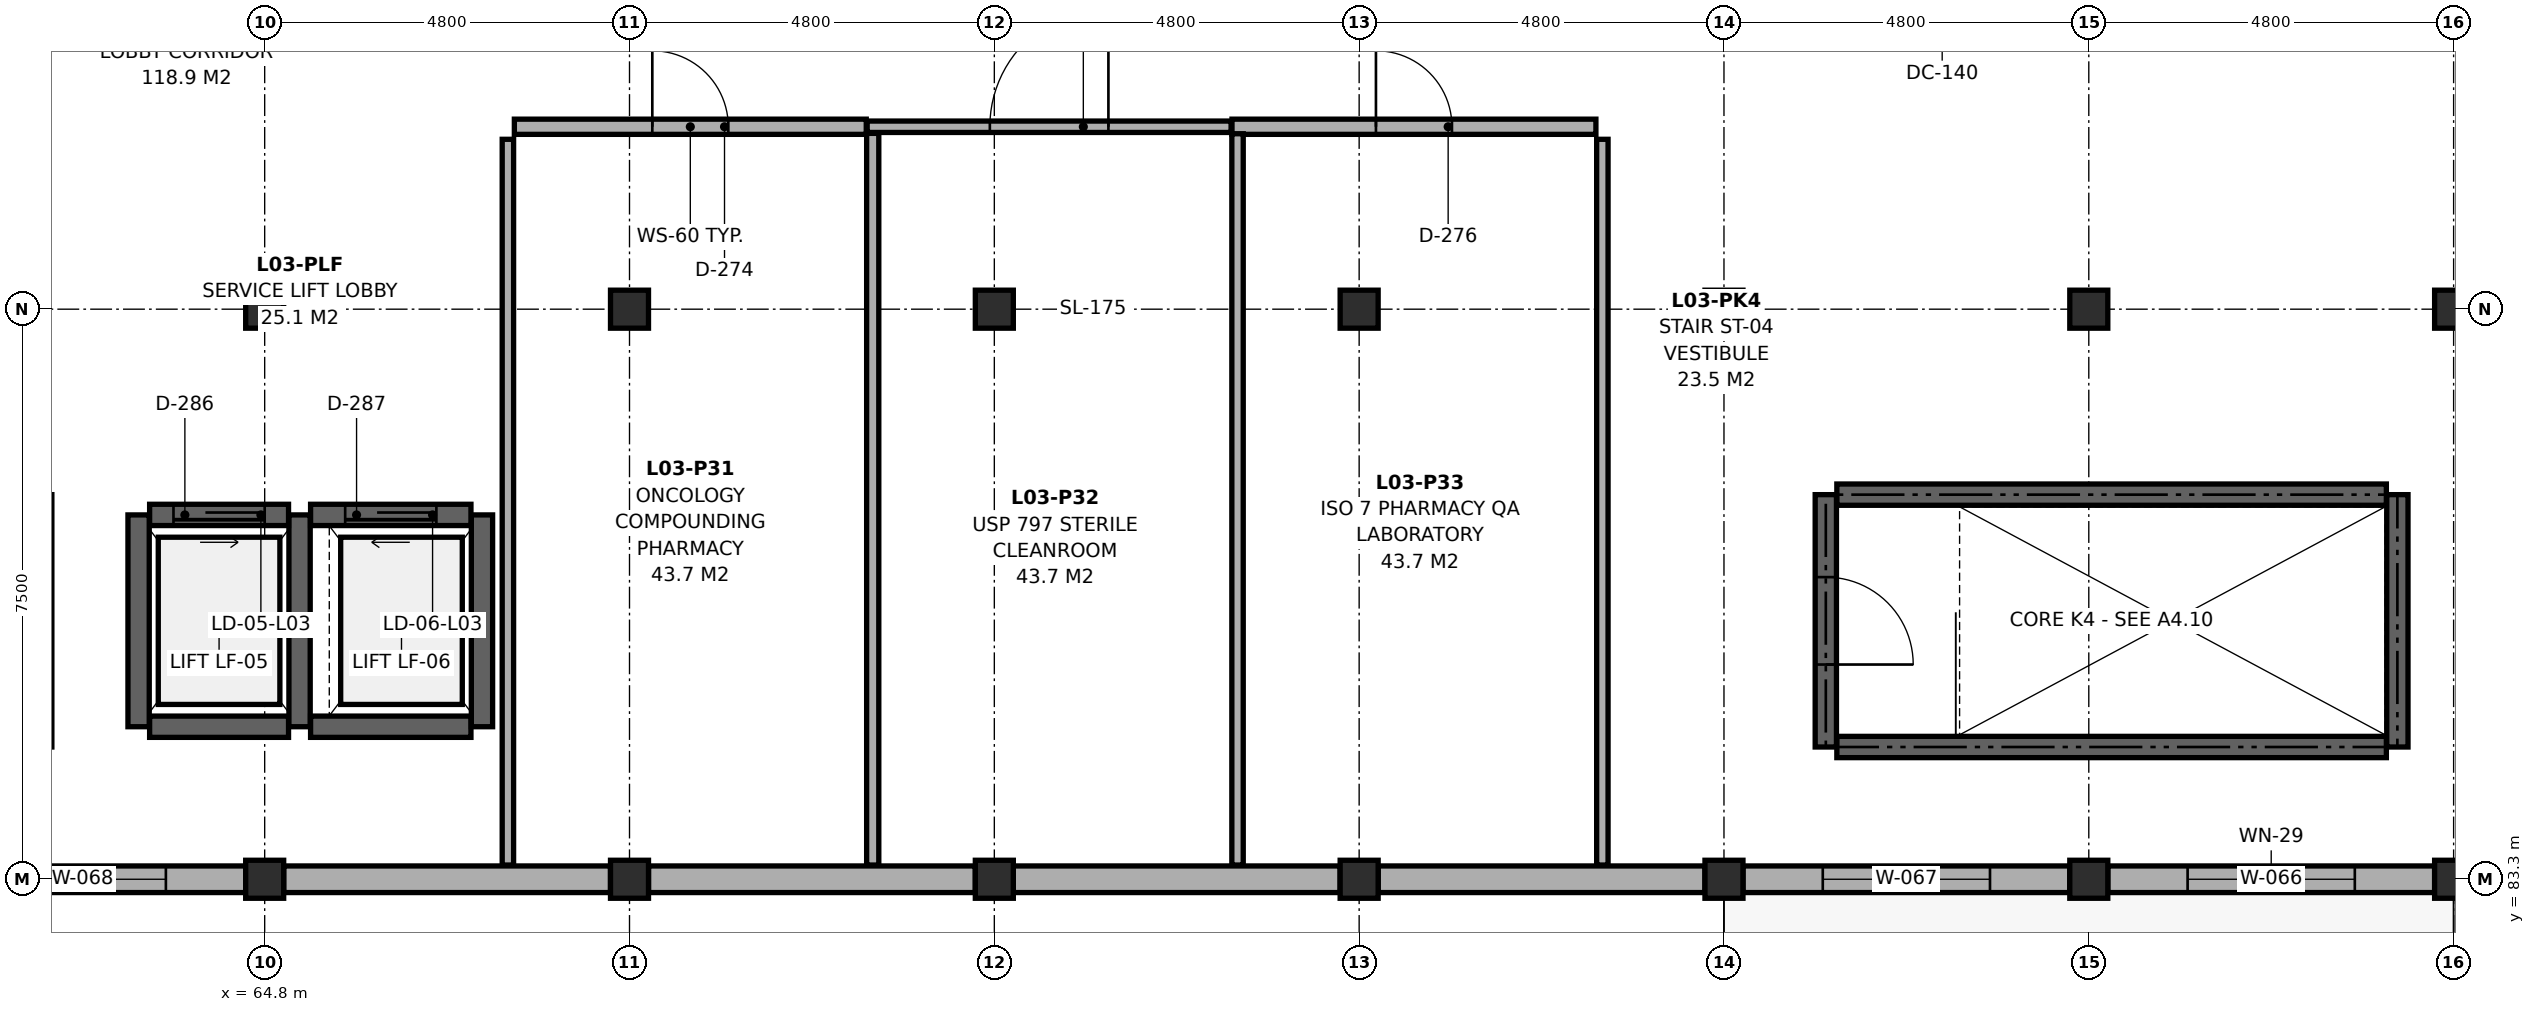
"""IFC4 building model, lengths in metres.
Left out: names, types, materials, properties, quantities, classifications, styles, units other than length and angle.
Written with IfcOpenShell. Run it as: python <this file> out.ifc"""

import sys

from ifc_helpers import new_model, si_unit, direction, frame, frame_2d, origin, origin_2d, place, context, subcontext, project, spatial, rectangle, extrude, element, fill, save


model = new_model("IFC4")
c1 = context("Model", 3, precision=1e-05, world=origin(), true_north=direction((0.0, 1.0)))
c2 = subcontext(c1, "Body", "Model", "MODEL_VIEW")
j1 = project(units=[si_unit("LENGTHUNIT", "METRE"), si_unit("PLANEANGLEUNIT", "RADIAN")], contexts=[c1])
p1 = place(None, origin())
s1 = spatial("IfcSite", under=j1, at=p1, CompositionType="ELEMENT")
p2 = place(p1, origin())
s2 = spatial("IfcBuilding", under=s1, at=p2, CompositionType="ELEMENT")
p3 = place(p2, frame((0.0, 0.0, 13.5)))
s3 = spatial("IfcBuildingStorey", under=s2, at=p3, CompositionType="ELEMENT", Elevation=13.5)
p4 = place(p3, frame((64.8, 83.3, 0.0), z_axis=(0.0, 0.0, 1.0), x_axis=(1.0, 0.0, 0.0)))
e1 = element("IfcColumn", 1, at=p4, inside=s3, PredefinedType="COLUMN", context=c2, shape_type="SweptSolid", body=[
    extrude(rectangle(XDim=0.5, YDim=0.5, at=origin_2d()), origin(), (0.0, 0.0, 1.0), 3.829),
])
p5 = place(p3, frame((64.8, 90.8, 0.0), z_axis=(0.0, 0.0, 1.0), x_axis=(1.0, 0.0, 0.0)))
e2 = element("IfcColumn", 2, at=p5, inside=s3, PredefinedType="COLUMN", context=c2, shape_type="SweptSolid", body=[
    extrude(rectangle(XDim=0.5, YDim=0.5, at=origin_2d()), origin(), (0.0, 0.0, 1.0), 4.429),
])
p6 = place(p3, frame((69.6, 83.3, 0.0), z_axis=(0.0, 0.0, 1.0), x_axis=(1.0, 0.0, 0.0)))
e3 = element("IfcColumn", 3, at=p6, inside=s3, PredefinedType="COLUMN", context=c2, shape_type="SweptSolid", body=[
    extrude(rectangle(XDim=0.5, YDim=0.5, at=origin_2d()), origin(), (0.0, 0.0, 1.0), 3.829),
])
p7 = place(p3, frame((69.6, 90.8, 0.0), z_axis=(0.0, 0.0, 1.0), x_axis=(1.0, 0.0, 0.0)))
e4 = element("IfcColumn", 4, at=p7, inside=s3, PredefinedType="COLUMN", context=c2, shape_type="SweptSolid", body=[
    extrude(rectangle(XDim=0.5, YDim=0.5, at=origin_2d()), origin(), (0.0, 0.0, 1.0), 4.429),
])
for number, where, z_axis, x_axis in (
    (5, (74.4, 83.3, 0.0), (0.0, 0.0, 1.0), (1.0, 0.0, 0.0)),
    (6, (74.4, 90.8, 0.0), (0.0, 0.0, 1.0), (1.0, 0.0, 0.0)),
    (7, (79.2, 83.3, 0.0), (0.0, 0.0, 1.0), (1.0, 0.0, 0.0)),
    (8, (79.2, 90.8, 0.0), (0.0, 0.0, 1.0), (1.0, 0.0, 0.0)),
    (9, (84.0, 83.3, 0.0), (0.0, 0.0, 1.0), (1.0, 0.0, 0.0)),
    (10, (84.0, 90.8, 0.0), (0.0, 0.0, 1.0), (1.0, 0.0, 0.0)),
    (11, (88.8, 83.3, 0.0), (0.0, 0.0, 1.0), (1.0, 0.0, 0.0)),
    (12, (88.8, 90.8, 0.0), (0.0, 0.0, 1.0), (1.0, 0.0, 0.0)),
    (13, (93.6, 83.3, 0.0), (0.0, 0.0, 1.0), (1.0, 0.0, 0.0)),
    (14, (93.6, 90.8, 0.0), (0.0, 0.0, 1.0), (1.0, 0.0, 0.0)),
):
    element("IfcColumn", number, at=place(p3, frame(where, z_axis=z_axis, x_axis=x_axis)), inside=s3, PredefinedType="COLUMN", context=c2, shape_type="SweptSolid", body=[
        extrude(rectangle(XDim=0.5, YDim=0.5, at=origin_2d()), origin(), (0.0, 0.0, 1.0), 3.8),
    ])
p8 = place(p3, frame((93.35, 83.3, 0.0), z_axis=(0.0, 0.0, 1.0), x_axis=(-1.0, 0.0, 0.0)))
e15 = element("IfcWall", 15, at=p8, inside=s3, PredefinedType="SOLIDWALL", context=c2, shape_type="SweptSolid", body=[
    extrude(rectangle(XDim=4.3, YDim=0.35, at=frame_2d((2.15, 0.0))), origin(), (0.0, 0.0, 1.0), 3.7),
])
p9 = place(p8, frame((1.05, 0.0, 0.9)))
e16 = element("IfcOpeningElement", 16, at=p9, cuts=e15, PredefinedType="OPENING", context=c2, shape_type="SweptSolid", body=[
    extrude(rectangle(XDim=2.2, YDim=1.3, at=frame_2d((1.1, 0.65))), frame((0.0, 0.187, 0.0), z_axis=(0.0, -1.0, 0.0), x_axis=(1.0, 0.0, 0.0)), (0.0, 0.0, 1.0), 0.374),
])
p10 = place(p3, frame((88.55, 83.3, 0.0), z_axis=(0.0, 0.0, 1.0), x_axis=(-1.0, 0.0, 0.0)))
e17 = element("IfcWall", 17, at=p10, inside=s3, PredefinedType="SOLIDWALL", context=c2, shape_type="SweptSolid", body=[
    extrude(rectangle(XDim=4.3, YDim=0.35, at=frame_2d((2.15, 0.0))), origin(), (0.0, 0.0, 1.0), 3.7),
])
p11 = place(p10, frame((1.05, 0.0, 0.9)))
e18 = element("IfcOpeningElement", 18, at=p11, cuts=e17, PredefinedType="OPENING", context=c2, shape_type="SweptSolid", body=[
    extrude(rectangle(XDim=2.2, YDim=1.5, at=frame_2d((1.1, 0.75))), frame((0.0, 0.187, 0.0), z_axis=(0.0, -1.0, 0.0), x_axis=(1.0, 0.0, 0.0)), (0.0, 0.0, 1.0), 0.374),
])
for number, where, z_axis, x_axis in (
    (19, (83.75, 83.3, 0.0), (0.0, 0.0, 1.0), (-1.0, 0.0, 0.0)),
    (20, (78.95, 83.3, 0.0), (0.0, 0.0, 1.0), (-1.0, 0.0, 0.0)),
):
    element("IfcWall", number, at=place(p3, frame(where, z_axis=z_axis, x_axis=x_axis)), inside=s3, PredefinedType="SOLIDWALL", context=c2, shape_type="SweptSolid", body=[
        extrude(rectangle(XDim=4.3, YDim=0.35, at=frame_2d((2.15, 0.0))), origin(), (0.0, 0.0, 1.0), 3.7),
    ])
p12 = place(p3, frame((74.15, 83.3, 0.0), z_axis=(0.0, 0.0, 1.0), x_axis=(-1.0, 0.0, 0.0)))
e21 = element("IfcWall", 21, at=p12, inside=s3, PredefinedType="SOLIDWALL", context=c2, shape_type="SweptSolid", body=[
    extrude(rectangle(XDim=4.3, YDim=0.35, at=frame_2d((2.15, 0.0))), origin(), (0.0, 0.0, 1.0), 3.7),
])
p13 = place(p3, frame((69.35, 83.3, 0.0), z_axis=(0.0, 0.0, 1.0), x_axis=(-1.0, 0.0, 0.0)))
e22 = element("IfcWall", 22, at=p13, inside=s3, PredefinedType="SOLIDWALL", context=c2, shape_type="SweptSolid", body=[
    extrude(rectangle(XDim=4.3, YDim=0.35, at=frame_2d((2.15, 0.0))), origin(), (0.0, 0.0, 1.0), 3.7),
])
p14 = place(p3, frame((64.55, 83.3, 0.0), z_axis=(0.0, 0.0, 1.0), x_axis=(-1.0, 0.0, 0.0)))
e23 = element("IfcWall", 23, at=p14, inside=s3, PredefinedType="SOLIDWALL", context=c2, shape_type="SweptSolid", body=[
    extrude(rectangle(XDim=4.3, YDim=0.35, at=frame_2d((2.15, 0.0))), origin(), (0.0, 0.0, 1.0), 3.7),
])
p15 = place(p14, frame((1.05, 0.0, 0.9)))
e24 = element("IfcOpeningElement", 24, at=p15, cuts=e23, PredefinedType="OPENING", context=c2, shape_type="SweptSolid", body=[
    extrude(rectangle(XDim=2.2, YDim=1.7, at=frame_2d((1.1, 0.85))), frame((0.0, 0.187, 0.0), z_axis=(0.0, -1.0, 0.0), x_axis=(1.0, 0.0, 0.0)), (0.0, 0.0, 1.0), 0.374),
])
p16 = place(p3, frame((61.86, 85.04, 0.0), z_axis=(0.0, 0.0, 1.0), x_axis=(0.0, 1.0, 0.0)))
e25 = element("IfcWall", 25, at=p16, inside=s3, PredefinedType="SHEAR", context=c2, shape_type="SweptSolid", body=[
    extrude(rectangle(XDim=3.32, YDim=0.28, at=frame_2d((1.66, 0.0))), origin(), (0.0, 0.0, 1.0), 3.72),
])
p17 = place(p3, frame((63.286, 85.307, 0.0), z_axis=(0.0, 0.0, 1.0), x_axis=(1.0, 0.0, 0.0)))
e26 = element("IfcWall", 26, at=p17, inside=s3, PredefinedType="SHEAR", context=c2, shape_type="SweptSolid", body=[
    extrude(rectangle(XDim=1.828, YDim=0.28, at=frame_2d((0.914, 0.0))), origin(), (0.0, 0.0, 1.0), 5.3),
])
p18 = place(p3, frame((65.259, 85.307, 0.0), z_axis=(0.0, 0.0, 1.0), x_axis=(0.0, 1.0, 0.0)))
e27 = element("IfcWall", 27, at=p18, inside=s3, PredefinedType="SHEAR", context=c2, shape_type="SweptSolid", body=[
    extrude(rectangle(XDim=2.787, YDim=0.28, at=frame_2d((1.393, 0.0))), origin(), (0.0, 0.0, 1.0), 5.3),
])
p19 = place(p3, frame((65.114, 88.093, 0.0), z_axis=(0.0, 0.0, 1.0), x_axis=(-1.0, 0.0, 0.0)))
e28 = element("IfcWall", 28, at=p19, inside=s3, PredefinedType="SHEAR", context=c2, shape_type="SweptSolid", body=[
    extrude(rectangle(XDim=1.828, YDim=0.28, at=frame_2d((0.914, 0.0))), origin(), (0.0, 0.0, 1.0), 5.3),
])
p20 = place(p19, frame((0.314, 0.0, 0.0)))
e29 = element("IfcOpeningElement", 29, at=p20, cuts=e28, PredefinedType="OPENING", context=c2, shape_type="SweptSolid", body=[
    extrude(rectangle(XDim=1.2, YDim=2.15, at=frame_2d((0.6, 1.075))), frame((0.0, 0.152, 0.0), z_axis=(0.0, -1.0, 0.0), x_axis=(1.0, 0.0, 0.0)), (0.0, 0.0, 1.0), 0.304),
])
p21 = place(p3, frame((63.141, 88.093, 0.0), z_axis=(0.0, 0.0, 1.0), x_axis=(0.0, -1.0, 0.0)))
e30 = element("IfcWall", 30, at=p21, inside=s3, PredefinedType="SHEAR", context=c2, shape_type="SweptSolid", body=[
    extrude(rectangle(XDim=2.787, YDim=0.28, at=frame_2d((1.393, 0.0))), origin(), (0.0, 0.0, 1.0), 5.3),
])
p22 = place(p3, frame((65.404, 85.307, 0.0), z_axis=(0.0, 0.0, 1.0), x_axis=(1.0, 0.0, 0.0)))
e31 = element("IfcWall", 31, at=p22, inside=s3, PredefinedType="SHEAR", context=c2, shape_type="SweptSolid", body=[
    extrude(rectangle(XDim=2.11, YDim=0.28, at=frame_2d((1.055, 0.0))), origin(), (0.0, 0.0, 1.0), 5.3),
])
p23 = place(p3, frame((67.659, 85.307, 0.0), z_axis=(0.0, 0.0, 1.0), x_axis=(0.0, 1.0, 0.0)))
e32 = element("IfcWall", 32, at=p23, inside=s3, PredefinedType="SHEAR", context=c2, shape_type="SweptSolid", body=[
    extrude(rectangle(XDim=2.787, YDim=0.28, at=frame_2d((1.393, 0.0))), origin(), (0.0, 0.0, 1.0), 5.3),
])
p24 = place(p3, frame((67.514, 88.093, 0.0), z_axis=(0.0, 0.0, 1.0), x_axis=(-1.0, 0.0, 0.0)))
e33 = element("IfcWall", 33, at=p24, inside=s3, PredefinedType="SHEAR", context=c2, shape_type="SweptSolid", body=[
    extrude(rectangle(XDim=2.11, YDim=0.28, at=frame_2d((1.055, 0.0))), origin(), (0.0, 0.0, 1.0), 5.3),
])
p25 = place(p24, frame((0.455, 0.0, 0.0)))
e34 = element("IfcOpeningElement", 34, at=p25, cuts=e33, PredefinedType="OPENING", context=c2, shape_type="SweptSolid", body=[
    extrude(rectangle(XDim=1.2, YDim=2.15, at=frame_2d((0.6, 1.075))), frame((0.0, 0.152, 0.0), z_axis=(0.0, -1.0, 0.0), x_axis=(1.0, 0.0, 0.0)), (0.0, 0.0, 1.0), 0.304),
])
p26 = place(p3, frame((85.485, 85.04, 0.0), z_axis=(0.0, 0.0, 1.0), x_axis=(1.0, 0.0, 0.0)))
e35 = element("IfcWall", 35, at=p26, inside=s3, PredefinedType="SHEAR", context=c2, shape_type="SweptSolid", body=[
    extrude(rectangle(XDim=7.23, YDim=0.28, at=frame_2d((3.615, 0.0))), origin(), (0.0, 0.0, 1.0), 3.72),
])
p27 = place(p3, frame((92.86, 85.04, 0.0), z_axis=(0.0, 0.0, 1.0), x_axis=(0.0, 1.0, 0.0)))
e36 = element("IfcWall", 36, at=p27, inside=s3, PredefinedType="SHEAR", context=c2, shape_type="SweptSolid", body=[
    extrude(rectangle(XDim=3.32, YDim=0.28, at=frame_2d((1.66, 0.0))), origin(), (0.0, 0.0, 1.0), 3.72),
])
p28 = place(p3, frame((92.715, 88.36, 0.0), z_axis=(0.0, 0.0, 1.0), x_axis=(-1.0, 0.0, 0.0)))
e37 = element("IfcWall", 37, at=p28, inside=s3, PredefinedType="SHEAR", context=c2, shape_type="SweptSolid", body=[
    extrude(rectangle(XDim=7.23, YDim=0.28, at=frame_2d((3.615, 0.0))), origin(), (0.0, 0.0, 1.0), 3.72),
])
p29 = place(p3, frame((85.34, 88.36, 0.0), z_axis=(0.0, 0.0, 1.0), x_axis=(0.0, -1.0, 0.0)))
e38 = element("IfcWall", 38, at=p29, inside=s3, PredefinedType="SHEAR", context=c2, shape_type="SweptSolid", body=[
    extrude(rectangle(XDim=3.32, YDim=0.28, at=frame_2d((1.66, 0.0))), origin(), (0.0, 0.0, 1.0), 3.72),
])
p30 = place(p29, frame((1.085, 0.0, 0.0)))
e39 = element("IfcOpeningElement", 39, at=p30, cuts=e38, PredefinedType="OPENING", context=c2, shape_type="SweptSolid", body=[
    extrude(rectangle(XDim=1.15, YDim=2.15, at=frame_2d((0.575, 1.075))), frame((0.0, 0.152, 0.0), z_axis=(0.0, -1.0, 0.0), x_axis=(1.0, 0.0, 0.0)), (0.0, 0.0, 1.0), 0.304),
])
p31 = place(p3, frame((68.085, 93.2, 0.0), z_axis=(0.0, 0.0, 1.0), x_axis=(1.0, 0.0, 0.0)))
e40 = element("IfcWall", 40, at=p31, inside=s3, PredefinedType="PARTITIONING", context=c2, shape_type="SweptSolid", body=[
    extrude(rectangle(XDim=4.63, YDim=0.2, at=frame_2d((2.315, 0.0))), origin(), (0.0, 0.0, 1.0), 3.7),
])
p32 = place(p31, frame((1.815, 0.0, 0.0)))
e41 = element("IfcOpeningElement", 41, at=p32, cuts=e40, PredefinedType="OPENING", context=c2, shape_type="SweptSolid", body=[
    extrude(rectangle(XDim=1.0, YDim=2.15, at=frame_2d((0.5, 1.075))), frame((0.0, 0.112, 0.0), z_axis=(0.0, -1.0, 0.0), x_axis=(1.0, 0.0, 0.0)), (0.0, 0.0, 1.0), 0.224),
])
p33 = place(p3, frame((72.727, 93.2, 0.0), z_axis=(0.0, 0.0, 1.0), x_axis=(1.0, 0.0, 0.0)))
e42 = element("IfcWall", 42, at=p33, inside=s3, PredefinedType="PARTITIONING", context=c2, shape_type="SweptSolid", body=[
    extrude(rectangle(XDim=4.788, YDim=0.15, at=frame_2d((2.394, 0.0))), origin(), (0.0, 0.0, 1.0), 3.7),
])
p34 = place(p33, frame((1.614, 0.0, 0.0)))
e43 = element("IfcOpeningElement", 43, at=p34, cuts=e42, PredefinedType="OPENING", context=c2, shape_type="SweptSolid", body=[
    extrude(rectangle(XDim=1.56, YDim=2.3, at=frame_2d((0.78, 1.15))), frame((0.0, 0.087, 0.0), z_axis=(0.0, -1.0, 0.0), x_axis=(1.0, 0.0, 0.0)), (0.0, 0.0, 1.0), 0.174),
])
p35 = place(p3, frame((77.527, 93.2, 0.0), z_axis=(0.0, 0.0, 1.0), x_axis=(1.0, 0.0, 0.0)))
e44 = element("IfcWall", 44, at=p35, inside=s3, PredefinedType="PARTITIONING", context=c2, shape_type="SweptSolid", body=[
    extrude(rectangle(XDim=4.788, YDim=0.2, at=frame_2d((2.394, 0.0))), origin(), (0.0, 0.0, 1.0), 3.7),
])
p36 = place(p35, frame((1.894, 0.0, 0.0)))
e45 = element("IfcOpeningElement", 45, at=p36, cuts=e44, PredefinedType="OPENING", context=c2, shape_type="SweptSolid", body=[
    extrude(rectangle(XDim=1.0, YDim=2.15, at=frame_2d((0.5, 1.075))), frame((0.0, 0.112, 0.0), z_axis=(0.0, -1.0, 0.0), x_axis=(1.0, 0.0, 0.0)), (0.0, 0.0, 1.0), 0.224),
])
p37 = place(p3, frame((68.0, 83.487, 0.0), z_axis=(0.0, 0.0, 1.0), x_axis=(0.0, 1.0, 0.0)))
e46 = element("IfcWall", 46, at=p37, inside=s3, PredefinedType="PARTITIONING", context=c2, shape_type="SweptSolid", body=[
    extrude(rectangle(XDim=9.548, YDim=0.15, at=frame_2d((4.774, 0.0))), origin(), (0.0, 0.0, 1.0), 3.7),
])
p38 = place(p3, frame((72.8, 83.487, 0.0), z_axis=(0.0, 0.0, 1.0), x_axis=(0.0, 1.0, 0.0)))
e47 = element("IfcWall", 47, at=p38, inside=s3, PredefinedType="PARTITIONING", context=c2, shape_type="SweptSolid", body=[
    extrude(rectangle(XDim=9.626, YDim=0.16, at=frame_2d((4.813, 0.0))), origin(), (0.0, 0.0, 1.0), 3.7),
])
p39 = place(p3, frame((77.6, 83.487, 0.0), z_axis=(0.0, 0.0, 1.0), x_axis=(0.0, 1.0, 0.0)))
e48 = element("IfcWall", 48, at=p39, inside=s3, PredefinedType="PARTITIONING", context=c2, shape_type="SweptSolid", body=[
    extrude(rectangle(XDim=9.621, YDim=0.15, at=frame_2d((4.811, 0.0))), origin(), (0.0, 0.0, 1.0), 3.7),
])
p40 = place(p3, frame((82.4, 83.487, 0.0), z_axis=(0.0, 0.0, 1.0), x_axis=(0.0, 1.0, 0.0)))
e49 = element("IfcWall", 49, at=p40, inside=s3, PredefinedType="PARTITIONING", context=c2, shape_type="SweptSolid", body=[
    extrude(rectangle(XDim=9.548, YDim=0.15, at=frame_2d((4.774, 0.0))), origin(), (0.0, 0.0, 1.0), 3.7),
])
p41 = place(p9, origin())
e50 = element("IfcWindow", 50, at=p41, inside=s3, PartitioningType="DOUBLE_PANEL_VERTICAL", PredefinedType="WINDOW", context=c2, shape_type="SweptSolid", body=[
    extrude(rectangle(XDim=2.2, YDim=1.3, at=frame_2d((1.1, 0.65))), frame((0.0, 0.03, 0.0), z_axis=(0.0, -1.0, 0.0), x_axis=(1.0, 0.0, 0.0)), (0.0, 0.0, 1.0), 0.06),
])
fill(e16, e50)
p42 = place(p11, origin())
e51 = element("IfcWindow", 51, at=p42, inside=s3, PartitioningType="DOUBLE_PANEL_VERTICAL", PredefinedType="WINDOW", context=c2, shape_type="SweptSolid", body=[
    extrude(rectangle(XDim=2.2, YDim=1.5, at=frame_2d((1.1, 0.75))), frame((0.0, 0.03, 0.0), z_axis=(0.0, -1.0, 0.0), x_axis=(1.0, 0.0, 0.0)), (0.0, 0.0, 1.0), 0.06),
])
fill(e18, e51)
p43 = place(p15, origin())
e52 = element("IfcWindow", 52, at=p43, inside=s3, PartitioningType="DOUBLE_PANEL_VERTICAL", PredefinedType="WINDOW", context=c2, shape_type="SweptSolid", body=[
    extrude(rectangle(XDim=2.2, YDim=1.7, at=frame_2d((1.1, 0.85))), frame((0.0, 0.03, 0.0), z_axis=(0.0, -1.0, 0.0), x_axis=(1.0, 0.0, 0.0)), (0.0, 0.0, 1.0), 0.06),
])
fill(e24, e52)
p44 = place(p20, origin())
e53 = element("IfcDoor", 53, at=p44, inside=s3, OperationType="SLIDING_TO_LEFT", PredefinedType="DOOR", context=c2, shape_type="SweptSolid", body=[
    extrude(rectangle(XDim=1.2, YDim=2.15, at=frame_2d((0.6, 1.075))), frame((0.0, 0.025, 0.0), z_axis=(0.0, -1.0, 0.0), x_axis=(1.0, 0.0, 0.0)), (0.0, 0.0, 1.0), 0.05),
])
fill(e29, e53)
p45 = place(p25, origin())
e54 = element("IfcDoor", 54, at=p45, inside=s3, OperationType="SLIDING_TO_RIGHT", PredefinedType="DOOR", context=c2, shape_type="SweptSolid", body=[
    extrude(rectangle(XDim=1.2, YDim=2.15, at=frame_2d((0.6, 1.075))), frame((0.0, 0.025, 0.0), z_axis=(0.0, -1.0, 0.0), x_axis=(1.0, 0.0, 0.0)), (0.0, 0.0, 1.0), 0.05),
])
fill(e34, e54)
p46 = place(p30, origin())
e55 = element("IfcDoor", 55, at=p46, inside=s3, OperationType="SINGLE_SWING_RIGHT", PredefinedType="DOOR", context=c2, shape_type="SweptSolid", body=[
    extrude(rectangle(XDim=1.15, YDim=2.15, at=frame_2d((0.575, 1.075))), frame((0.0, 0.025, 0.0), z_axis=(0.0, -1.0, 0.0), x_axis=(1.0, 0.0, 0.0)), (0.0, 0.0, 1.0), 0.05),
])
fill(e39, e55)
p47 = place(p32, origin())
e56 = element("IfcDoor", 56, at=p47, inside=s3, OperationType="SINGLE_SWING_LEFT", PredefinedType="DOOR", context=c2, shape_type="SweptSolid", body=[
    extrude(rectangle(XDim=1.0, YDim=2.15, at=frame_2d((0.5, 1.075))), frame((0.0, 0.025, 0.0), z_axis=(0.0, -1.0, 0.0), x_axis=(1.0, 0.0, 0.0)), (0.0, 0.0, 1.0), 0.05),
])
fill(e41, e56)
p48 = place(p34, origin())
e57 = element("IfcDoor", 57, at=p48, inside=s3, OperationType="SINGLE_SWING_RIGHT", PredefinedType="DOOR", context=c2, shape_type="SweptSolid", body=[
    extrude(rectangle(XDim=1.56, YDim=2.3, at=frame_2d((0.78, 1.15))), frame((0.0, 0.025, 0.0), z_axis=(0.0, -1.0, 0.0), x_axis=(1.0, 0.0, 0.0)), (0.0, 0.0, 1.0), 0.05),
])
fill(e43, e57)
p49 = place(p36, origin())
e58 = element("IfcDoor", 58, at=p49, inside=s3, OperationType="SINGLE_SWING_LEFT", PredefinedType="DOOR", context=c2, shape_type="SweptSolid", body=[
    extrude(rectangle(XDim=1.0, YDim=2.15, at=frame_2d((0.5, 1.075))), frame((0.0, 0.025, 0.0), z_axis=(0.0, -1.0, 0.0), x_axis=(1.0, 0.0, 0.0)), (0.0, 0.0, 1.0), 0.05),
])
fill(e45, e58)
save(model, sys.argv[1])
